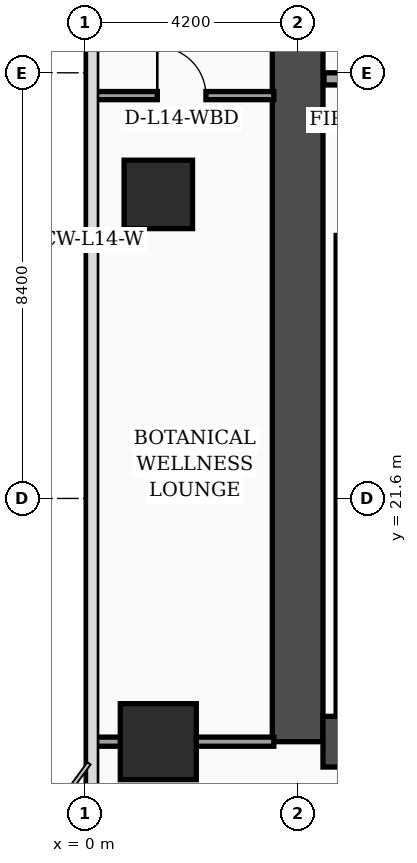
"""IFC4 building model, lengths in metres.
Left out: names, types, materials, properties, quantities, classifications, styles, units other than length and angle.
Written with IfcOpenShell. Run it as: python <this file> out.ifc"""

import sys

from ifc_helpers import new_model, si_unit, direction, frame, frame_2d, origin, origin_2d, place, context, subcontext, project, spatial, rectangle, extrude, element, fill, save


model = new_model("IFC4")
c1 = context("Model", 3, precision=1e-05, world=origin(), true_north=direction((0.0, 1.0)))
c2 = subcontext(c1, "Body", "Model", "MODEL_VIEW")
j1 = project(units=[si_unit("LENGTHUNIT", "METRE"), si_unit("PLANEANGLEUNIT", "RADIAN")], contexts=[c1])
p1 = place(None, origin())
s1 = spatial("IfcSite", under=j1, at=p1, CompositionType="ELEMENT")
p2 = place(p1, origin())
s2 = spatial("IfcBuilding", under=s1, at=p2, CompositionType="ELEMENT")
p3 = place(p2, frame((0.0, 0.0, 62.2)))
s3 = spatial("IfcBuildingStorey", under=s2, at=p3, CompositionType="ELEMENT", Elevation=62.2)
p4 = place(p3, frame((4.2, 16.8, 0.0), z_axis=(0.0, 0.0, 1.0), x_axis=(0.0, 1.0, 0.0)))
e1 = element("IfcWall", 1, at=p4, inside=s3, PredefinedType="SHEAR", context=c2, shape_type="SweptSolid", body=[
    extrude(rectangle(XDim=21.6, YDim=1.0, at=frame_2d((10.8, 0.0))), origin(), (0.0, 0.0, 1.0), 3.56),
])
p5 = place(p3, frame((4.7, 16.8, 0.0), z_axis=(0.0, 0.0, 1.0), x_axis=(1.0, 0.0, 0.0)))
e2 = element("IfcWall", 2, at=p5, inside=s3, PredefinedType="SHEAR", context=c2, shape_type="SweptSolid", body=[
    extrude(rectangle(XDim=9.8, YDim=1.0, at=frame_2d((4.9, 0.0))), origin(), (0.0, 0.0, 1.0), 3.56),
])
p6 = place(p3, frame((5.08, 17.3, 0.0), z_axis=(0.0, 0.0, 1.0), x_axis=(0.0, 1.0, 0.0)))
e3 = element("IfcWall", 3, at=p6, inside=s3, PredefinedType="SOLIDWALL", context=c2, shape_type="SweptSolid", body=[
    extrude(rectangle(XDim=9.49, YDim=0.24, at=frame_2d((4.745, 0.0))), origin(), (0.0, 0.0, 1.0), 3.56),
])
p7 = place(p3, frame((1.45, 16.8, 0.0), z_axis=(0.0, 0.0, 1.0), x_axis=(1.0, 0.0, 0.0)))
e4 = element("IfcColumn", 4, at=p7, inside=s3, PredefinedType="COLUMN", context=c2, shape_type="SweptSolid", body=[
    extrude(rectangle(XDim=1.5, YDim=1.5, at=origin_2d()), origin(), (0.0, 0.0, 1.0), 3.56),
])
p8 = place(p3, frame((1.45, 27.6, 0.0), z_axis=(0.0, 0.0, 1.0), x_axis=(1.0, 0.0, 0.0)))
e5 = element("IfcColumn", 5, at=p8, inside=s3, PredefinedType="COLUMN", context=c2, shape_type="SweptSolid", body=[
    extrude(rectangle(XDim=1.35, YDim=1.35, at=origin_2d()), origin(), (0.0, 0.0, 1.0), 3.56),
])
p9 = place(p3, frame((4.72, 29.88, 0.0), z_axis=(0.0, 0.0, 1.0), x_axis=(1.0, 0.0, 0.0)))
e6 = element("IfcWall", 6, at=p9, inside=s3, PredefinedType="SOLIDWALL", context=c2, shape_type="SweptSolid", body=[
    extrude(rectangle(XDim=4.7, YDim=0.24, at=frame_2d((2.35, 0.0))), origin(), (0.0, 0.0, 1.0), 3.56),
])
p10 = place(p9, frame((0.45, 0.0, 0.0)))
e7 = element("IfcOpeningElement", 7, at=p10, cuts=e6, PredefinedType="OPENING", context=c2, shape_type="SweptSolid", body=[
    extrude(rectangle(XDim=1.3, YDim=2.35, at=frame_2d((0.65, 1.175))), frame((0.0, 0.13, 0.0), z_axis=(0.0, -1.0, 0.0), x_axis=(1.0, 0.0, 0.0)), (0.0, 0.0, 1.0), 0.26),
])
p11 = place(p3, frame((0.08, 29.55, 0.0), z_axis=(0.0, 0.0, 1.0), x_axis=(1.0, 0.0, 0.0)))
e8 = element("IfcWall", 8, at=p11, inside=s3, PredefinedType="PARTITIONING", context=c2, shape_type="SweptSolid", body=[
    extrude(rectangle(XDim=3.65, YDim=0.16, at=frame_2d((1.825, 0.0))), origin(), (0.0, 0.0, 1.0), 3.04),
])
p12 = place(p11, frame((1.35, 0.0, 0.0)))
e9 = element("IfcOpeningElement", 9, at=p12, cuts=e8, PredefinedType="OPENING", context=c2, shape_type="SweptSolid", body=[
    extrude(rectangle(XDim=0.96, YDim=2.2, at=frame_2d((0.48, 1.1))), frame((0.0, 0.09, 0.0), z_axis=(0.0, -1.0, 0.0), x_axis=(1.0, 0.0, 0.0)), (0.0, 0.0, 1.0), 0.18),
])
p13 = place(p3, frame((0.08, 16.8, 0.0), z_axis=(0.0, 0.0, 1.0), x_axis=(1.0, 0.0, 0.0)))
e10 = element("IfcWall", 10, at=p13, inside=s3, PredefinedType="PARTITIONING", context=c2, shape_type="SweptSolid", body=[
    extrude(rectangle(XDim=3.65, YDim=0.18, at=frame_2d((1.825, 0.0))), origin(), (0.0, 0.0, 1.0), 2.84),
])
p14 = place(p12, origin())
e11 = element("IfcDoor", 11, at=p14, inside=s3, OperationType="SINGLE_SWING_LEFT", PredefinedType="DOOR", context=c2, shape_type="SweptSolid", body=[
    extrude(rectangle(XDim=0.96, YDim=2.2, at=frame_2d((0.48, 1.1))), frame((0.0, 0.025, 0.0), z_axis=(0.0, -1.0, 0.0), x_axis=(1.0, 0.0, 0.0)), (0.0, 0.0, 1.0), 0.05),
])
fill(e9, e11)
save(model, sys.argv[1])
